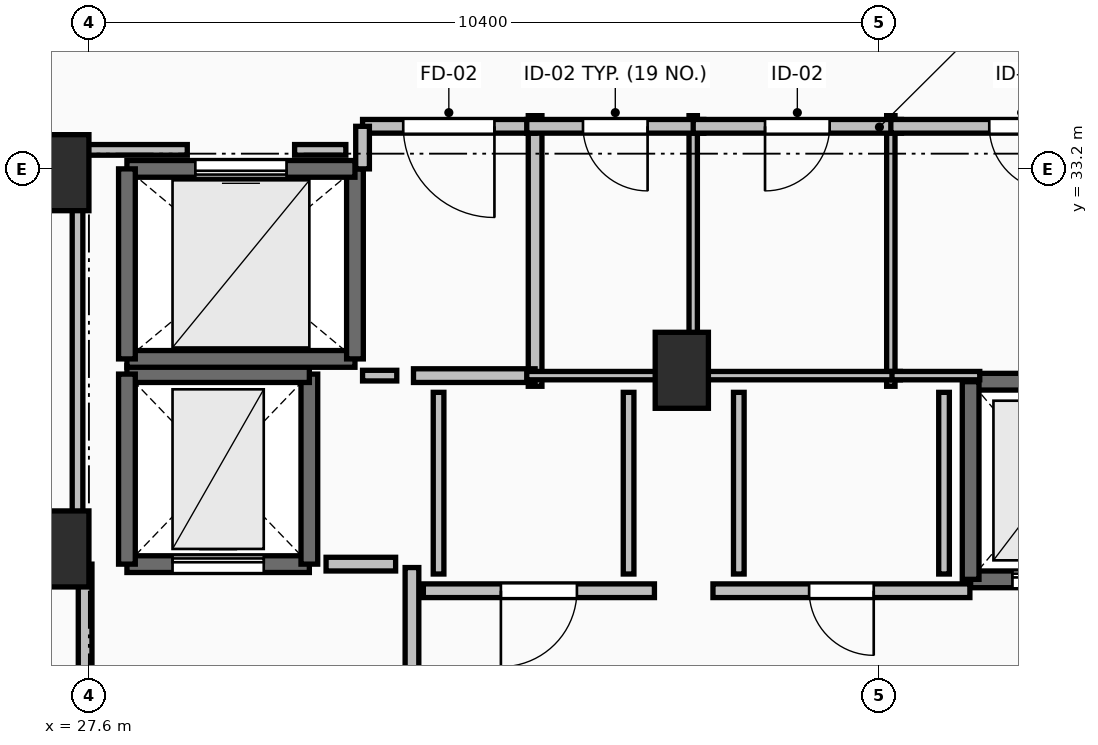
"""IFC4 building model, lengths in metres.
Left out: names, types, materials, properties, quantities, classifications, styles, units other than length and angle.
Written with IfcOpenShell. Run it as: python <this file> out.ifc"""

import sys

from ifc_helpers import new_model, si_unit, direction, frame, frame_2d, origin, origin_2d, place, context, subcontext, project, spatial, rectangle, extrude, element, fill, save


model = new_model("IFC4")
c1 = context("Model", 3, precision=1e-05, world=origin(), true_north=direction((0.0, 1.0)))
c2 = subcontext(c1, "Body", "Model", "MODEL_VIEW")
j1 = project(units=[si_unit("LENGTHUNIT", "METRE"), si_unit("PLANEANGLEUNIT", "RADIAN")], contexts=[c1])
p1 = place(None, origin())
s1 = spatial("IfcSite", under=j1, at=p1, CompositionType="ELEMENT")
p2 = place(p1, origin())
s2 = spatial("IfcBuilding", under=s1, at=p2, CompositionType="ELEMENT")
p3 = place(p2, frame((0.0, 0.0, 248.45)))
s3 = spatial("IfcBuildingStorey", under=s2, at=p3, CompositionType="ELEMENT", Elevation=248.45)
for number, where, z_axis, x_axis in (
    (1, (27.25, 28.2, 0.0), (0.0, 0.0, 1.0), (1.0, 0.0, 0.0)),
    (2, (27.25, 33.15, 0.0), (0.0, 0.0, 1.0), (1.0, 0.0, 0.0)),
    (3, (35.4, 30.55, 0.0), (0.0, 0.0, 1.0), (1.0, 0.0, 0.0)),
):
    element("IfcColumn", number, at=place(p3, frame(where, z_axis=z_axis, x_axis=x_axis)), inside=s3, PredefinedType="PILASTER", context=c2, shape_type="SweptSolid", body=[
        extrude(rectangle(XDim=0.7, YDim=1.0, at=origin_2d()), origin(), (0.0, 0.0, 1.0), 3.55),
    ])
p4 = place(p3, frame((39.2, 27.8, 0.0), z_axis=(0.0, 0.0, 1.0), x_axis=(1.0, 0.0, 0.0)))
e4 = element("IfcWall", 4, at=p4, inside=s3, PredefinedType="SOLIDWALL", context=c2, shape_type="SweptSolid", body=[
    extrude(rectangle(XDim=2.2, YDim=0.22, at=frame_2d((1.1, 0.0))), origin(), (0.0, 0.0, 1.0), 3.29),
])
p5 = place(p4, frame((0.55, 0.0, 0.0)))
e5 = element("IfcOpeningElement", 5, at=p5, cuts=e4, PredefinedType="OPENING", context=c2, shape_type="SweptSolid", body=[
    extrude(rectangle(XDim=1.1, YDim=2.2, at=frame_2d((0.55, 1.1))), frame((0.0, 0.125, 0.0), z_axis=(0.0, -1.0, 0.0), x_axis=(1.0, 0.0, 0.0)), (0.0, 0.0, 1.0), 0.25),
])
p6 = place(p3, frame((41.4, 30.4, 0.0), z_axis=(0.0, 0.0, 1.0), x_axis=(-1.0, 0.0, 0.0)))
e6 = element("IfcWall", 6, at=p6, inside=s3, PredefinedType="SOLIDWALL", context=c2, shape_type="SweptSolid", body=[
    extrude(rectangle(XDim=2.2, YDim=0.22, at=frame_2d((1.1, 0.0))), origin(), (0.0, 0.0, 1.0), 3.29),
])
p7 = place(p3, frame((39.2, 30.4, 0.0), z_axis=(0.0, 0.0, 1.0), x_axis=(0.0, -1.0, 0.0)))
e7 = element("IfcWall", 7, at=p7, inside=s3, PredefinedType="SOLIDWALL", context=c2, shape_type="SweptSolid", body=[
    extrude(rectangle(XDim=2.6, YDim=0.22, at=frame_2d((1.3, 0.0))), origin(), (0.0, 0.0, 1.0), 3.29),
])
p8 = place(p3, frame((28.1, 28.0, 0.0), z_axis=(0.0, 0.0, 1.0), x_axis=(1.0, 0.0, 0.0)))
e8 = element("IfcWall", 8, at=p8, inside=s3, PredefinedType="SHEAR", context=c2, shape_type="SweptSolid", body=[
    extrude(rectangle(XDim=2.4, YDim=0.22, at=frame_2d((1.2, 0.0))), origin(), (0.0, 0.0, 1.0), 3.29),
])
p9 = place(p8, frame((0.6, 0.0, 0.0)))
e9 = element("IfcOpeningElement", 9, at=p9, cuts=e8, PredefinedType="OPENING", context=c2, shape_type="SweptSolid", body=[
    extrude(rectangle(XDim=1.2, YDim=2.2, at=frame_2d((0.6, 1.1))), frame((0.0, 0.125, 0.0), z_axis=(0.0, -1.0, 0.0), x_axis=(1.0, 0.0, 0.0)), (0.0, 0.0, 1.0), 0.25),
])
p10 = place(p3, frame((30.5, 28.0, 0.0), z_axis=(0.0, 0.0, 1.0), x_axis=(0.0, 1.0, 0.0)))
e10 = element("IfcWall", 10, at=p10, inside=s3, PredefinedType="SHEAR", context=c2, shape_type="SweptSolid", body=[
    extrude(rectangle(XDim=2.5, YDim=0.22, at=frame_2d((1.25, 0.0))), origin(), (0.0, 0.0, 1.0), 3.29),
])
p11 = place(p3, frame((30.5, 30.5, 0.0), z_axis=(0.0, 0.0, 1.0), x_axis=(-1.0, 0.0, 0.0)))
e11 = element("IfcWall", 11, at=p11, inside=s3, PredefinedType="SHEAR", context=c2, shape_type="SweptSolid", body=[
    extrude(rectangle(XDim=2.4, YDim=0.22, at=frame_2d((1.2, 0.0))), origin(), (0.0, 0.0, 1.0), 3.29),
])
p12 = place(p3, frame((28.1, 30.5, 0.0), z_axis=(0.0, 0.0, 1.0), x_axis=(0.0, -1.0, 0.0)))
e12 = element("IfcWall", 12, at=p12, inside=s3, PredefinedType="SHEAR", context=c2, shape_type="SweptSolid", body=[
    extrude(rectangle(XDim=2.5, YDim=0.22, at=frame_2d((1.25, 0.0))), origin(), (0.0, 0.0, 1.0), 3.29),
])
p13 = place(p3, frame((28.1, 30.7, 0.0), z_axis=(0.0, 0.0, 1.0), x_axis=(1.0, 0.0, 0.0)))
e13 = element("IfcWall", 13, at=p13, inside=s3, PredefinedType="SOLIDWALL", context=c2, shape_type="SweptSolid", body=[
    extrude(rectangle(XDim=3.0, YDim=0.22, at=frame_2d((1.5, 0.0))), origin(), (0.0, 0.0, 1.0), 3.29),
])
p14 = place(p3, frame((31.1, 30.7, 0.0), z_axis=(0.0, 0.0, 1.0), x_axis=(0.0, 1.0, 0.0)))
e14 = element("IfcWall", 14, at=p14, inside=s3, PredefinedType="SOLIDWALL", context=c2, shape_type="SweptSolid", body=[
    extrude(rectangle(XDim=2.5, YDim=0.22, at=frame_2d((1.25, 0.0))), origin(), (0.0, 0.0, 1.0), 3.29),
])
p15 = place(p3, frame((31.1, 33.2, 0.0), z_axis=(0.0, 0.0, 1.0), x_axis=(-1.0, 0.0, 0.0)))
e15 = element("IfcWall", 15, at=p15, inside=s3, PredefinedType="SOLIDWALL", context=c2, shape_type="SweptSolid", body=[
    extrude(rectangle(XDim=3.0, YDim=0.22, at=frame_2d((1.5, 0.0))), origin(), (0.0, 0.0, 1.0), 3.29),
])
p16 = place(p15, frame((0.9, 0.0, 0.0)))
e16 = element("IfcOpeningElement", 16, at=p16, cuts=e15, PredefinedType="OPENING", context=c2, shape_type="SweptSolid", body=[
    extrude(rectangle(XDim=1.2, YDim=2.2, at=frame_2d((0.6, 1.1))), frame((0.0, 0.125, 0.0), z_axis=(0.0, -1.0, 0.0), x_axis=(1.0, 0.0, 0.0)), (0.0, 0.0, 1.0), 0.25),
])
p17 = place(p3, frame((28.1, 33.2, 0.0), z_axis=(0.0, 0.0, 1.0), x_axis=(0.0, -1.0, 0.0)))
e17 = element("IfcWall", 17, at=p17, inside=s3, PredefinedType="SOLIDWALL", context=c2, shape_type="SweptSolid", body=[
    extrude(rectangle(XDim=2.5, YDim=0.22, at=frame_2d((1.25, 0.0))), origin(), (0.0, 0.0, 1.0), 3.29),
])
p18 = place(p3, frame((31.85, 24.045, 0.0), z_axis=(0.0, 0.0, 1.0), x_axis=(0.0, 1.0, 0.0)))
e18 = element("IfcWall", 18, at=p18, inside=s3, PredefinedType="PARTITIONING", context=c2, shape_type="SweptSolid", body=[
    extrude(rectangle(XDim=3.91, YDim=0.18, at=frame_2d((1.955, 0.0))), origin(), (0.0, 0.0, 1.0), 3.29),
])
p19 = place(p18, frame((1.355, 0.0, 0.0)))
e19 = element("IfcOpeningElement", 19, at=p19, cuts=e18, PredefinedType="OPENING", context=c2, shape_type="SweptSolid", body=[
    extrude(rectangle(XDim=1.2, YDim=2.15, at=frame_2d((0.6, 1.075))), frame((0.0, 0.105, 0.0), z_axis=(0.0, -1.0, 0.0), x_axis=(1.0, 0.0, 0.0)), (0.0, 0.0, 1.0), 0.21),
])
p20 = place(p3, frame((27.55, 28.0, 0.0), z_axis=(0.0, 0.0, 1.0), x_axis=(0.0, -1.0, 0.0)))
e20 = element("IfcWall", 20, at=p20, inside=s3, PredefinedType="PARTITIONING", context=c2, shape_type="SweptSolid", body=[
    extrude(rectangle(XDim=4.05, YDim=0.18, at=frame_2d((2.025, 0.0))), origin(), (0.0, 0.0, 1.0), 3.29),
])
p21 = place(p20, frame((1.425, 0.0, 0.0)))
e21 = element("IfcOpeningElement", 21, at=p21, cuts=e20, PredefinedType="OPENING", context=c2, shape_type="SweptSolid", body=[
    extrude(rectangle(XDim=1.2, YDim=2.15, at=frame_2d((0.6, 1.075))), frame((0.0, 0.105, 0.0), z_axis=(0.0, -1.0, 0.0), x_axis=(1.0, 0.0, 0.0)), (0.0, 0.0, 1.0), 0.21),
])
p22 = place(p3, frame((33.47, 30.34, 0.0), z_axis=(0.0, 0.0, 1.0), x_axis=(0.0, 1.0, 0.0)))
e22 = element("IfcWall", 22, at=p22, inside=s3, PredefinedType="PARTITIONING", context=c2, shape_type="SweptSolid", body=[
    extrude(rectangle(XDim=3.56, YDim=0.18, at=frame_2d((1.78, 0.0))), origin(), (0.0, 0.0, 1.0), 3.29),
])
p23 = place(p3, frame((31.87, 30.48, 0.0), z_axis=(0.0, 0.0, 1.0), x_axis=(1.0, 0.0, 0.0)))
e23 = element("IfcWall", 23, at=p23, inside=s3, PredefinedType="PARTITIONING", context=c2, shape_type="SweptSolid", body=[
    extrude(rectangle(XDim=1.6, YDim=0.18, at=frame_2d((0.8, 0.0))), origin(), (0.0, 0.0, 1.0), 3.29),
])
p24 = place(p3, frame((33.47, 33.76, 0.0), z_axis=(0.0, 0.0, 1.0), x_axis=(-1.0, 0.0, 0.0)))
e24 = element("IfcWall", 24, at=p24, inside=s3, PredefinedType="PARTITIONING", context=c2, shape_type="SweptSolid", body=[
    extrude(rectangle(XDim=2.27, YDim=0.18, at=frame_2d((1.135, 0.0))), origin(), (0.0, 0.0, 1.0), 3.29),
])
p25 = place(p24, frame((0.535, 0.0, 0.0)))
e25 = element("IfcOpeningElement", 25, at=p25, cuts=e24, PredefinedType="OPENING", context=c2, shape_type="SweptSolid", body=[
    extrude(rectangle(XDim=1.2, YDim=2.15, at=frame_2d((0.6, 1.075))), frame((0.0, 0.105, 0.0), z_axis=(0.0, -1.0, 0.0), x_axis=(1.0, 0.0, 0.0)), (0.0, 0.0, 1.0), 0.21),
])
p26 = place(p3, frame((31.2, 33.76, 0.0), z_axis=(0.0, 0.0, 1.0), x_axis=(0.0, -1.0, 0.0)))
e26 = element("IfcWall", 26, at=p26, inside=s3, PredefinedType="PARTITIONING", context=c2, shape_type="SweptSolid", body=[
    extrude(rectangle(XDim=0.56, YDim=0.18, at=frame_2d((0.28, 0.0))), origin(), (0.0, 0.0, 1.0), 3.29),
])
p27 = place(p3, frame((35.04, 27.65, 0.0), z_axis=(0.0, 0.0, 1.0), x_axis=(-1.0, 0.0, 0.0)))
e27 = element("IfcWall", 27, at=p27, inside=s3, PredefinedType="PARTITIONING", context=c2, shape_type="SweptSolid", body=[
    extrude(rectangle(XDim=3.04, YDim=0.18, at=frame_2d((1.52, 0.0))), origin(), (0.0, 0.0, 1.0), 3.29),
])
p28 = place(p27, frame((1.02, 0.0, 0.0)))
e28 = element("IfcOpeningElement", 28, at=p28, cuts=e27, PredefinedType="OPENING", context=c2, shape_type="SweptSolid", body=[
    extrude(rectangle(XDim=1.0, YDim=2.15, at=frame_2d((0.5, 1.075))), frame((0.0, 0.105, 0.0), z_axis=(0.0, -1.0, 0.0), x_axis=(1.0, 0.0, 0.0)), (0.0, 0.0, 1.0), 0.21),
])
p29 = place(p3, frame((39.19, 27.65, 0.0), z_axis=(0.0, 0.0, 1.0), x_axis=(-1.0, 0.0, 0.0)))
e29 = element("IfcWall", 29, at=p29, inside=s3, PredefinedType="PARTITIONING", context=c2, shape_type="SweptSolid", body=[
    extrude(rectangle(XDim=3.38, YDim=0.18, at=frame_2d((1.69, 0.0))), origin(), (0.0, 0.0, 1.0), 3.29),
])
p30 = place(p29, frame((1.265, 0.0, 0.0)))
e30 = element("IfcOpeningElement", 30, at=p30, cuts=e29, PredefinedType="OPENING", context=c2, shape_type="SweptSolid", body=[
    extrude(rectangle(XDim=0.85, YDim=2.1, at=frame_2d((0.425, 1.05))), frame((0.0, 0.105, 0.0), z_axis=(0.0, -1.0, 0.0), x_axis=(1.0, 0.0, 0.0)), (0.0, 0.0, 1.0), 0.21),
])
p31 = place(p3, frame((35.55, 30.34, 0.0), z_axis=(0.0, 0.0, 1.0), x_axis=(0.0, 1.0, 0.0)))
e31 = element("IfcWall", 31, at=p31, inside=s3, PredefinedType="PARTITIONING", context=c2, shape_type="SweptSolid", body=[
    extrude(rectangle(XDim=3.56, YDim=0.11, at=frame_2d((1.78, 0.0))), origin(), (0.0, 0.0, 1.0), 2.482),
])
p32 = place(p3, frame((33.36, 30.48, 0.0), z_axis=(0.0, 0.0, 1.0), x_axis=(1.0, 0.0, 0.0)))
e32 = element("IfcWall", 32, at=p32, inside=s3, PredefinedType="PARTITIONING", context=c2, shape_type="SweptSolid", body=[
    extrude(rectangle(XDim=1.81, YDim=0.11, at=frame_2d((0.905, 0.0))), origin(), (0.0, 0.0, 1.0), 3.29),
])
p33 = place(p3, frame((35.69, 33.76, 0.0), z_axis=(0.0, 0.0, 1.0), x_axis=(-1.0, 0.0, 0.0)))
e33 = element("IfcWall", 33, at=p33, inside=s3, PredefinedType="PARTITIONING", context=c2, shape_type="SweptSolid", body=[
    extrude(rectangle(XDim=2.33, YDim=0.18, at=frame_2d((1.165, 0.0))), origin(), (0.0, 0.0, 1.0), 3.29),
])
p34 = place(p33, frame((0.74, 0.0, 0.0)))
e34 = element("IfcOpeningElement", 34, at=p34, cuts=e33, PredefinedType="OPENING", context=c2, shape_type="SweptSolid", body=[
    extrude(rectangle(XDim=0.85, YDim=2.1, at=frame_2d((0.425, 1.05))), frame((0.0, 0.105, 0.0), z_axis=(0.0, -1.0, 0.0), x_axis=(1.0, 0.0, 0.0)), (0.0, 0.0, 1.0), 0.21),
])
p35 = place(p3, frame((38.15, 30.34, 0.0), z_axis=(0.0, 0.0, 1.0), x_axis=(0.0, 1.0, 0.0)))
e35 = element("IfcWall", 35, at=p35, inside=s3, PredefinedType="PARTITIONING", context=c2, shape_type="SweptSolid", body=[
    extrude(rectangle(XDim=3.56, YDim=0.11, at=frame_2d((1.78, 0.0))), origin(), (0.0, 0.0, 1.0), 2.482),
])
p36 = place(p3, frame((35.68, 30.48, 0.0), z_axis=(0.0, 0.0, 1.0), x_axis=(1.0, 0.0, 0.0)))
e36 = element("IfcWall", 36, at=p36, inside=s3, PredefinedType="PARTITIONING", context=c2, shape_type="SweptSolid", body=[
    extrude(rectangle(XDim=2.595, YDim=0.11, at=frame_2d((1.297, 0.0))), origin(), (0.0, 0.0, 1.0), 2.482),
])
p37 = place(p3, frame((38.29, 33.76, 0.0), z_axis=(0.0, 0.0, 1.0), x_axis=(-1.0, 0.0, 0.0)))
e37 = element("IfcWall", 37, at=p37, inside=s3, PredefinedType="PARTITIONING", context=c2, shape_type="SweptSolid", body=[
    extrude(rectangle(XDim=2.74, YDim=0.18, at=frame_2d((1.37, 0.0))), origin(), (0.0, 0.0, 1.0), 3.29),
])
p38 = place(p37, frame((0.945, 0.0, 0.0)))
e38 = element("IfcOpeningElement", 38, at=p38, cuts=e37, PredefinedType="OPENING", context=c2, shape_type="SweptSolid", body=[
    extrude(rectangle(XDim=0.85, YDim=2.1, at=frame_2d((0.425, 1.05))), frame((0.0, 0.105, 0.0), z_axis=(0.0, -1.0, 0.0), x_axis=(1.0, 0.0, 0.0)), (0.0, 0.0, 1.0), 0.21),
])
p39 = place(p3, frame((38.165, 30.48, 0.0), z_axis=(0.0, 0.0, 1.0), x_axis=(1.0, 0.0, 0.0)))
e39 = element("IfcWall", 39, at=p39, inside=s3, PredefinedType="PARTITIONING", context=c2, shape_type="SweptSolid", body=[
    extrude(rectangle(XDim=1.155, YDim=0.11, at=frame_2d((0.578, 0.0))), origin(), (0.0, 0.0, 1.0), 2.482),
])
p40 = place(p3, frame((41.59, 33.76, 0.0), z_axis=(0.0, 0.0, 1.0), x_axis=(-1.0, 0.0, 0.0)))
e40 = element("IfcWall", 40, at=p40, inside=s3, PredefinedType="PARTITIONING", context=c2, shape_type="SweptSolid", body=[
    extrude(rectangle(XDim=3.44, YDim=0.18, at=frame_2d((1.72, 0.0))), origin(), (0.0, 0.0, 1.0), 3.29),
])
p41 = place(p40, frame((1.295, 0.0, 0.0)))
e41 = element("IfcOpeningElement", 41, at=p41, cuts=e40, PredefinedType="OPENING", context=c2, shape_type="SweptSolid", body=[
    extrude(rectangle(XDim=0.85, YDim=2.1, at=frame_2d((0.425, 1.05))), frame((0.0, 0.105, 0.0), z_axis=(0.0, -1.0, 0.0), x_axis=(1.0, 0.0, 0.0)), (0.0, 0.0, 1.0), 0.21),
])
p42 = place(p3, frame((31.635, 28.0, 0.0), z_axis=(0.0, 0.0, 1.0), x_axis=(-1.0, 0.0, 0.0)))
e42 = element("IfcWall", 42, at=p42, inside=s3, PredefinedType="PARTITIONING", context=c2, shape_type="SweptSolid", body=[
    extrude(rectangle(XDim=0.915, YDim=0.18, at=frame_2d((0.458, 0.0))), origin(), (0.0, 0.0, 1.0), 3.29),
])
p43 = place(p3, frame((31.2, 30.48, 0.0), z_axis=(0.0, 0.0, 1.0), x_axis=(1.0, 0.0, 0.0)))
e43 = element("IfcWall", 43, at=p43, inside=s3, PredefinedType="PARTITIONING", context=c2, shape_type="SweptSolid", body=[
    extrude(rectangle(XDim=0.45, YDim=0.14, at=frame_2d((0.225, 0.0))), origin(), (0.0, 0.0, 1.0), 3.29),
])
for number, where, z_axis, x_axis in (
    (44, (32.2, 30.26, 0.0), (0.0, 0.0, 1.0), (0.0, -1.0, 0.0)),
    (45, (34.7, 27.87, 0.0), (0.0, 0.0, 1.0), (0.0, 1.0, 0.0)),
    (46, (36.15, 30.26, 0.0), (0.0, 0.0, 1.0), (0.0, -1.0, 0.0)),
    (47, (38.85, 27.87, 0.0), (0.0, 0.0, 1.0), (0.0, 1.0, 0.0)),
):
    element("IfcWall", number, at=place(p3, frame(where, z_axis=z_axis, x_axis=x_axis)), inside=s3, PredefinedType="PARTITIONING", context=c2, shape_type="SweptSolid", body=[
        extrude(rectangle(XDim=2.39, YDim=0.14, at=frame_2d((1.195, 0.0))), origin(), (0.0, 0.0, 1.0), 3.29),
    ])
p44 = place(p3, frame((30.98, 33.45, 0.0), z_axis=(0.0, 0.0, 1.0), x_axis=(-1.0, 0.0, 0.0)))
e48 = element("IfcWall", 48, at=p44, inside=s3, PredefinedType="PARTITIONING", context=c2, shape_type="SweptSolid", body=[
    extrude(rectangle(XDim=0.674, YDim=0.14, at=frame_2d((0.337, 0.0))), origin(), (0.0, 0.0, 1.0), 3.29),
])
p45 = place(p3, frame((28.894, 33.45, 0.0), z_axis=(0.0, 0.0, 1.0), x_axis=(-1.0, 0.0, 0.0)))
e49 = element("IfcWall", 49, at=p45, inside=s3, PredefinedType="PARTITIONING", context=c2, shape_type="SweptSolid", body=[
    extrude(rectangle(XDim=1.444, YDim=0.14, at=frame_2d((0.722, 0.0))), origin(), (0.0, 0.0, 1.0), 2.482),
])
p46 = place(p3, frame((27.45, 33.45, 0.0), z_axis=(0.0, 0.0, 1.0), x_axis=(0.0, -1.0, 0.0)))
e50 = element("IfcWall", 50, at=p46, inside=s3, PredefinedType="PARTITIONING", context=c2, shape_type="SweptSolid", body=[
    extrude(rectangle(XDim=5.254, YDim=0.14, at=frame_2d((2.627, 0.0))), origin(), (0.0, 0.0, 1.0), 2.482),
])
p47 = place(p5, origin())
e51 = element("IfcDoor", 51, at=p47, inside=s3, OperationType="SLIDING_TO_LEFT", PredefinedType="DOOR", context=c2, shape_type="SweptSolid", body=[
    extrude(rectangle(XDim=1.1, YDim=2.2, at=frame_2d((0.55, 1.1))), frame((0.0, 0.025, 0.0), z_axis=(0.0, -1.0, 0.0), x_axis=(1.0, 0.0, 0.0)), (0.0, 0.0, 1.0), 0.05),
])
fill(e5, e51)
p48 = place(p9, origin())
e52 = element("IfcDoor", 52, at=p48, inside=s3, OperationType="SLIDING_TO_LEFT", PredefinedType="DOOR", context=c2, shape_type="SweptSolid", body=[
    extrude(rectangle(XDim=1.2, YDim=2.2, at=frame_2d((0.6, 1.1))), frame((0.0, 0.025, 0.0), z_axis=(0.0, -1.0, 0.0), x_axis=(1.0, 0.0, 0.0)), (0.0, 0.0, 1.0), 0.05),
])
fill(e9, e52)
p49 = place(p16, origin())
e53 = element("IfcDoor", 53, at=p49, inside=s3, OperationType="SLIDING_TO_LEFT", PredefinedType="DOOR", context=c2, shape_type="SweptSolid", body=[
    extrude(rectangle(XDim=1.2, YDim=2.2, at=frame_2d((0.6, 1.1))), frame((0.0, 0.025, 0.0), z_axis=(0.0, -1.0, 0.0), x_axis=(1.0, 0.0, 0.0)), (0.0, 0.0, 1.0), 0.05),
])
fill(e16, e53)
p50 = place(p25, origin())
e54 = element("IfcDoor", 54, at=p50, inside=s3, OperationType="SINGLE_SWING_LEFT", PredefinedType="DOOR", context=c2, shape_type="SweptSolid", body=[
    extrude(rectangle(XDim=1.2, YDim=2.15, at=frame_2d((0.6, 1.075))), frame((0.0, 0.025, 0.0), z_axis=(0.0, -1.0, 0.0), x_axis=(1.0, 0.0, 0.0)), (0.0, 0.0, 1.0), 0.05),
])
fill(e25, e54)
p51 = place(p28, origin())
e55 = element("IfcDoor", 55, at=p51, inside=s3, OperationType="SINGLE_SWING_RIGHT", PredefinedType="DOOR", context=c2, shape_type="SweptSolid", body=[
    extrude(rectangle(XDim=1.0, YDim=2.15, at=frame_2d((0.5, 1.075))), frame((0.0, 0.025, 0.0), z_axis=(0.0, -1.0, 0.0), x_axis=(1.0, 0.0, 0.0)), (0.0, 0.0, 1.0), 0.05),
])
fill(e28, e55)
p52 = place(p30, origin())
e56 = element("IfcDoor", 56, at=p52, inside=s3, OperationType="SINGLE_SWING_LEFT", PredefinedType="DOOR", context=c2, shape_type="SweptSolid", body=[
    extrude(rectangle(XDim=0.85, YDim=2.1, at=frame_2d((0.425, 1.05))), frame((0.0, 0.025, 0.0), z_axis=(0.0, -1.0, 0.0), x_axis=(1.0, 0.0, 0.0)), (0.0, 0.0, 1.0), 0.05),
])
fill(e30, e56)
p53 = place(p34, origin())
e57 = element("IfcDoor", 57, at=p53, inside=s3, OperationType="SINGLE_SWING_LEFT", PredefinedType="DOOR", context=c2, shape_type="SweptSolid", body=[
    extrude(rectangle(XDim=0.85, YDim=2.1, at=frame_2d((0.425, 1.05))), frame((0.0, 0.025, 0.0), z_axis=(0.0, -1.0, 0.0), x_axis=(1.0, 0.0, 0.0)), (0.0, 0.0, 1.0), 0.05),
])
fill(e34, e57)
p54 = place(p38, origin())
e58 = element("IfcDoor", 58, at=p54, inside=s3, OperationType="SINGLE_SWING_RIGHT", PredefinedType="DOOR", context=c2, shape_type="SweptSolid", body=[
    extrude(rectangle(XDim=0.85, YDim=2.1, at=frame_2d((0.425, 1.05))), frame((0.0, 0.025, 0.0), z_axis=(0.0, -1.0, 0.0), x_axis=(1.0, 0.0, 0.0)), (0.0, 0.0, 1.0), 0.05),
])
fill(e38, e58)
p55 = place(p41, origin())
e59 = element("IfcDoor", 59, at=p55, inside=s3, OperationType="SINGLE_SWING_LEFT", PredefinedType="DOOR", context=c2, shape_type="SweptSolid", body=[
    extrude(rectangle(XDim=0.85, YDim=2.1, at=frame_2d((0.425, 1.05))), frame((0.0, 0.025, 0.0), z_axis=(0.0, -1.0, 0.0), x_axis=(1.0, 0.0, 0.0)), (0.0, 0.0, 1.0), 0.05),
])
fill(e41, e59)
save(model, sys.argv[1])
